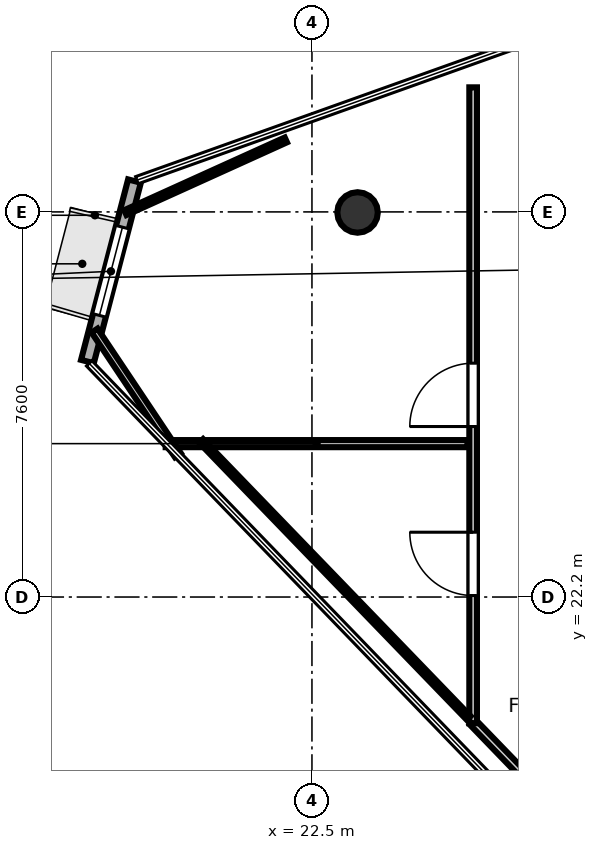
"""IFC4 building model, lengths in metres.
Left out: names, types, materials, properties, quantities, classifications, styles, units other than length and angle.
Written with IfcOpenShell. Run it as: python <this file> out.ifc"""

import sys

from ifc_helpers import new_model, si_unit, direction, frame, frame_2d, origin, origin_2d, place, context, subcontext, project, spatial, rectangle, hollow_circle, extrude, element, fill, save


model = new_model("IFC4")
c1 = context("Model", 3, precision=1e-05, world=origin(), true_north=direction((0.0, 1.0)))
c2 = subcontext(c1, "Body", "Model", "MODEL_VIEW")
j1 = project(units=[si_unit("LENGTHUNIT", "METRE"), si_unit("PLANEANGLEUNIT", "RADIAN")], contexts=[c1])
p1 = place(None, origin())
s1 = spatial("IfcSite", under=j1, at=p1, CompositionType="ELEMENT")
p2 = place(p1, origin())
s2 = spatial("IfcBuilding", under=s1, at=p2, CompositionType="ELEMENT")
p3 = place(p2, frame((0.0, 0.0, 337.0)))
s3 = spatial("IfcBuildingStorey", under=s2, at=p3, CompositionType="ELEMENT", Elevation=337.0)
p4 = place(p3, frame((23.4, 29.789, 0.0), z_axis=(0.0, 0.0, 1.0), x_axis=(1.0, 0.0, 0.0)))
e1 = element("IfcColumn", 1, at=p4, inside=s3, PredefinedType="COLUMN", context=c2, shape_type="SweptSolid", body=[
    extrude(hollow_circle(Radius=0.4, WallThickness=0.022, at=origin_2d()), origin(), (0.0, 0.0, 1.0), 3.7),
])
p5 = place(p3, frame((18.997, 30.409, 0.0), z_axis=(0.0, 0.0, 1.0), x_axis=(-0.252262578272, -0.967658819835, 0.0)))
e2 = element("IfcWall", 2, at=p5, inside=s3, PredefinedType="SOLIDWALL", context=c2, shape_type="SweptSolid", body=[
    extrude(rectangle(XDim=3.681, YDim=0.26, at=frame_2d((1.84, 0.0))), origin(), (0.0, 0.0, 1.0), 3.52),
])
p6 = place(p5, frame((0.94, 0.0, 0.85)))
e3 = element("IfcOpeningElement", 3, at=p6, cuts=e2, PredefinedType="OPENING", context=c2, shape_type="SweptSolid", body=[
    extrude(rectangle(XDim=1.8, YDim=2.1, at=frame_2d((0.9, 1.05))), frame((0.0, 0.14, 0.0), z_axis=(0.0, -1.0, 0.0), x_axis=(1.0, 0.0, 0.0)), (0.0, 0.0, 1.0), 0.28),
])
p7 = place(p3, frame((27.033, 18.322, 0.0), z_axis=(0.0, 0.0, 1.0), x_axis=(-0.69459673797, 0.719399313039, 0.0)))
e4 = element("IfcWall", 4, at=p7, inside=s3, PredefinedType="PARTITIONING", context=c2, shape_type="SweptSolid", body=[
    extrude(rectangle(XDim=1.959, YDim=0.15, at=frame_2d((0.979, 0.0))), origin(), (0.0, 0.0, 1.0), 2.84),
])
p8 = place(p3, frame((25.681, 19.709, 0.0), z_axis=(0.0, 0.0, 1.0), x_axis=(0.0, 1.0, 0.0)))
e5 = element("IfcWall", 5, at=p8, inside=s3, PredefinedType="PARTITIONING", context=c2, shape_type="SweptSolid", body=[
    extrude(rectangle(XDim=12.549, YDim=0.15, at=frame_2d((6.274, 0.0))), origin(), (0.0, 0.0, 1.0), 2.84),
])
p9 = place(p8, frame((2.52, 0.0, 0.0)))
e6 = element("IfcOpeningElement", 6, at=p9, cuts=e5, PredefinedType="OPENING", context=c2, shape_type="SweptSolid", body=[
    extrude(rectangle(XDim=1.25, YDim=2.2, at=frame_2d((0.625, 1.1))), frame((0.0, 0.085, 0.0), z_axis=(0.0, -1.0, 0.0), x_axis=(1.0, 0.0, 0.0)), (0.0, 0.0, 1.0), 0.17),
])
p10 = place(p8, frame((5.855, 0.0, 0.0)))
e7 = element("IfcOpeningElement", 7, at=p10, cuts=e5, PredefinedType="OPENING", context=c2, shape_type="SweptSolid", body=[
    extrude(rectangle(XDim=1.25, YDim=2.2, at=frame_2d((0.625, 1.1))), frame((0.0, 0.085, 0.0), z_axis=(0.0, -1.0, 0.0), x_axis=(1.0, 0.0, 0.0)), (0.0, 0.0, 1.0), 0.17),
])
p11 = place(p3, frame((19.613, 25.227, 0.0), z_axis=(0.0, 0.0, 1.0), x_axis=(1.0, 0.0, 0.0)))
e8 = element("IfcWall", 8, at=p11, inside=s3, PredefinedType="PARTITIONING", context=c2, shape_type="SweptSolid", body=[
    extrude(rectangle(XDim=5.957, YDim=0.14, at=frame_2d((2.979, 0.0))), origin(), (0.0, 0.0, 1.0), 2.84),
])
p12 = place(p3, frame((25.592, 19.813, 0.0), z_axis=(0.0, 0.0, 1.0), x_axis=(-0.694661596079, 0.71933668538, 0.0)))
e9 = element("IfcWall", 9, at=p12, inside=s3, PredefinedType="PARTITIONING", context=c2, shape_type="SweptSolid", body=[
    extrude(rectangle(XDim=7.599, YDim=0.105, at=frame_2d((3.799, 0.0))), origin(), (0.0, 0.0, 1.0), 2.84),
])
p13 = place(p3, frame((19.854, 24.998, 0.0), z_axis=(0.0, 0.0, 1.0), x_axis=(-0.555633001546, 0.831427668287, 0.0)))
e10 = element("IfcWall", 10, at=p13, inside=s3, PredefinedType="PARTITIONING", context=c2, shape_type="SweptSolid", body=[
    extrude(rectangle(XDim=2.958, YDim=0.14, at=frame_2d((1.479, 0.0))), origin(), (0.0, 0.0, 1.0), 2.84),
])
p14 = place(p3, frame((18.818, 29.786, 0.0), z_axis=(0.0, 0.0, 1.0), x_axis=(0.910930778055, 0.412559229192, 0.0)))
e11 = element("IfcWall", 11, at=p14, inside=s3, PredefinedType="PARTITIONING", context=c2, shape_type="SweptSolid", body=[
    extrude(rectangle(XDim=3.477, YDim=0.105, at=frame_2d((1.738, 0.0))), origin(), (0.0, 0.0, 1.0), 2.84),
])
p15 = place(p9, origin())
e12 = element("IfcDoor", 12, at=p15, inside=s3, OperationType="SINGLE_SWING_RIGHT", PredefinedType="DOOR", context=c2, shape_type="SweptSolid", body=[
    extrude(rectangle(XDim=1.25, YDim=2.2, at=frame_2d((0.625, 1.1))), frame((0.0, 0.025, 0.0), z_axis=(0.0, -1.0, 0.0), x_axis=(1.0, 0.0, 0.0)), (0.0, 0.0, 1.0), 0.05),
])
fill(e6, e12)
p16 = place(p10, origin())
e13 = element("IfcDoor", 13, at=p16, inside=s3, OperationType="SINGLE_SWING_LEFT", PredefinedType="DOOR", context=c2, shape_type="SweptSolid", body=[
    extrude(rectangle(XDim=1.25, YDim=2.2, at=frame_2d((0.625, 1.1))), frame((0.0, 0.025, 0.0), z_axis=(0.0, -1.0, 0.0), x_axis=(1.0, 0.0, 0.0)), (0.0, 0.0, 1.0), 0.05),
])
fill(e7, e13)
p17 = place(p6, origin())
e14 = element("IfcWindow", 14, at=p17, inside=s3, PartitioningType="SINGLE_PANEL", PredefinedType="WINDOW", context=c2, shape_type="SweptSolid", body=[
    extrude(rectangle(XDim=1.8, YDim=2.1, at=frame_2d((0.9, 1.05))), frame((0.0, 0.03, 0.0), z_axis=(0.0, -1.0, 0.0), x_axis=(1.0, 0.0, 0.0)), (0.0, 0.0, 1.0), 0.06),
])
fill(e3, e14)
save(model, sys.argv[1])
